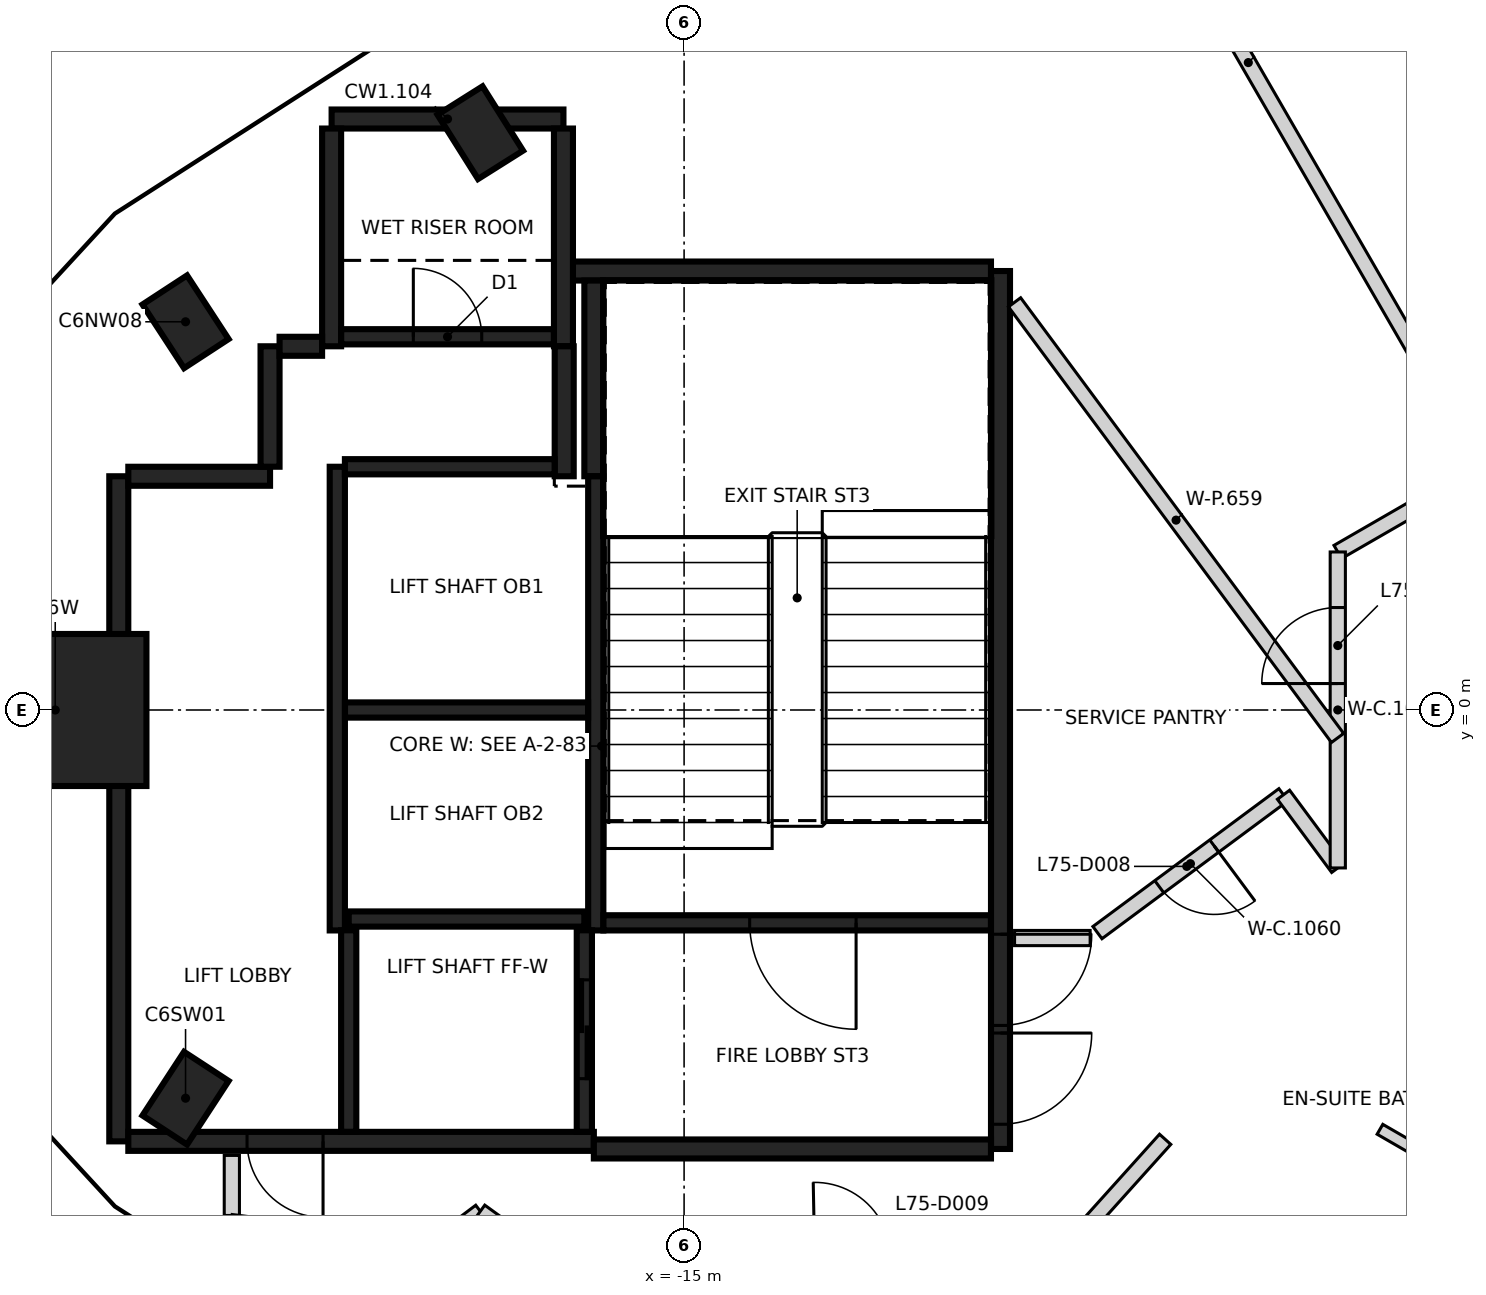
"""IFC4 building model, lengths in metres.
Left out: names, types, materials, properties, quantities, classifications, styles, units other than length and angle.
Written with IfcOpenShell. Run it as: python <this file> out.ifc"""

import sys

from ifc_helpers import new_model, si_unit, direction, frame, frame_2d, origin, origin_2d, place, context, subcontext, project, spatial, rectangle, extrude, element, fill, save


model = new_model("IFC4")
c1 = context("Model", 3, precision=1e-05, world=origin(), true_north=direction((0.0, 1.0)))
c2 = subcontext(c1, "Body", "Model", "MODEL_VIEW")
j1 = project(units=[si_unit("LENGTHUNIT", "METRE"), si_unit("PLANEANGLEUNIT", "RADIAN")], contexts=[c1])
p1 = place(None, origin())
s1 = spatial("IfcSite", under=j1, at=p1, CompositionType="ELEMENT")
p2 = place(p1, origin())
s2 = spatial("IfcBuilding", under=s1, at=p2, CompositionType="ELEMENT")
p3 = place(p2, frame((0.0, 0.0, 298.2)))
s3 = spatial("IfcBuildingStorey", under=s2, at=p3, CompositionType="ELEMENT", Elevation=298.2)
for number, where, z_axis, x_axis in (
    (1, (-17.681, 7.595, -0.35), (0.0, 0.0, 1.0), (-0.533, 0.846, 0.0)),
    (2, (-21.559, 5.107, -0.35), (0.0, 0.0, 1.0), (-0.547, 0.837, 0.0)),
    (3, (-21.559, -5.107, -0.35), (0.0, 0.0, 1.0), (0.547, 0.837, 0.0)),
):
    element("IfcColumn", number, at=place(p3, frame(where, z_axis=z_axis, x_axis=x_axis)), inside=s3, PredefinedType="COLUMN", context=c2, shape_type="SweptSolid", body=[
        extrude(rectangle(XDim=1.0, YDim=0.7, at=origin_2d()), origin(), (0.0, 0.0, 1.0), 2.64),
    ])
p4 = place(p3, frame((-23.273, 0.0, -0.35), z_axis=(0.0, 0.0, 1.0), x_axis=(1.0, 0.0, 0.0)))
e4 = element("IfcColumn", 4, at=p4, inside=s3, PredefinedType="COLUMN", context=c2, shape_type="SweptSolid", body=[
    extrude(rectangle(XDim=2.4, YDim=2.0, at=origin_2d()), origin(), (0.0, 0.0, 1.0), 3.55),
])
p5 = place(p3, frame((-10.837, 5.775, 0.0), z_axis=(0.0, 0.0, 1.0), x_axis=(0.0, -1.0, 0.0)))
e5 = element("IfcWall", 5, at=p5, inside=s3, PredefinedType="SHEAR", context=c2, shape_type="SweptSolid", body=[
    extrude(rectangle(XDim=11.55, YDim=0.25, at=frame_2d((5.775, 0.0))), origin(), (0.0, 0.0, 1.0), 3.2),
])
p6 = place(p5, frame((10.025, 0.0, 0.0)))
e6 = element("IfcOpeningElement", 6, at=p6, cuts=e5, PredefinedType="OPENING", context=c2, shape_type="SweptSolid", body=[
    extrude(rectangle(XDim=1.2, YDim=2.1, at=frame_2d((0.6, 1.05))), frame((0.0, 0.135, 0.0), z_axis=(0.0, -1.0, 0.0), x_axis=(1.0, 0.0, 0.0)), (0.0, 0.0, 1.0), 0.27),
])
p7 = place(p5, frame((8.725, 0.0, 0.0)))
e7 = element("IfcOpeningElement", 7, at=p7, cuts=e5, PredefinedType="OPENING", context=c2, shape_type="SweptSolid", body=[
    extrude(rectangle(XDim=1.2, YDim=2.1, at=frame_2d((0.6, 1.05))), frame((0.0, 0.135, 0.0), z_axis=(0.0, -1.0, 0.0), x_axis=(1.0, 0.0, 0.0)), (0.0, 0.0, 1.0), 0.27),
])
p8 = place(p3, frame((-22.437, -5.675, 0.0), z_axis=(0.0, 0.0, 1.0), x_axis=(0.0, 1.0, 0.0)))
e8 = element("IfcWall", 8, at=p8, inside=s3, PredefinedType="SHEAR", context=c2, shape_type="SweptSolid", body=[
    extrude(rectangle(XDim=8.75, YDim=0.25, at=frame_2d((4.375, 0.0))), origin(), (0.0, 0.0, 1.0), 3.2),
])
p9 = place(p3, frame((-16.187, -5.675, 0.0), z_axis=(0.0, 0.0, 1.0), x_axis=(-1.0, 0.0, 0.0)))
e9 = element("IfcWall", 9, at=p9, inside=s3, PredefinedType="SHEAR", context=c2, shape_type="SweptSolid", body=[
    extrude(rectangle(XDim=6.125, YDim=0.25, at=frame_2d((3.062, 0.0))), origin(), (0.0, 0.0, 1.0), 3.2),
])
p10 = place(p9, frame((3.563, 0.0, 0.0)))
e10 = element("IfcOpeningElement", 10, at=p10, cuts=e9, PredefinedType="OPENING", context=c2, shape_type="SweptSolid", body=[
    extrude(rectangle(XDim=1.0, YDim=2.1, at=frame_2d((0.5, 1.05))), frame((0.0, 0.135, 0.0), z_axis=(0.0, -1.0, 0.0), x_axis=(1.0, 0.0, 0.0)), (0.0, 0.0, 1.0), 0.27),
])
p11 = place(p3, frame((-10.963, -5.775, 0.0), z_axis=(0.0, 0.0, 1.0), x_axis=(-1.0, 0.0, 0.0)))
e11 = element("IfcWall", 11, at=p11, inside=s3, PredefinedType="SHEAR", context=c2, shape_type="SweptSolid", body=[
    extrude(rectangle(XDim=5.225, YDim=0.25, at=frame_2d((2.612, 0.0))), origin(), (0.0, 0.0, 1.0), 3.2),
])
p12 = place(p3, frame((-16.472, 5.775, 0.0), z_axis=(0.0, 0.0, 1.0), x_axis=(1.0, 0.0, 0.0)))
e12 = element("IfcWall", 12, at=p12, inside=s3, PredefinedType="SHEAR", context=c2, shape_type="SweptSolid", body=[
    extrude(rectangle(XDim=5.51, YDim=0.25, at=frame_2d((2.755, 0.0))), origin(), (0.0, 0.0, 1.0), 3.2),
])
p13 = place(p3, frame((-19.637, 7.775, 0.0), z_axis=(0.0, 0.0, 1.0), x_axis=(1.0, 0.0, 0.0)))
e13 = element("IfcWall", 13, at=p13, inside=s3, PredefinedType="SHEAR", context=c2, shape_type="SweptSolid", body=[
    extrude(rectangle(XDim=3.05, YDim=0.25, at=frame_2d((1.525, 0.0))), origin(), (0.0, 0.0, 1.0), 3.2),
])
for number, where, z_axis, x_axis in (
    (14, (-16.587, 7.65, 0.0), (0.0, 0.0, 1.0), (0.0, -1.0, 0.0)),
    (15, (-19.637, 4.785, 0.0), (0.0, 0.0, 1.0), (0.0, 1.0, 0.0)),
):
    element("IfcWall", number, at=place(p3, frame(where, z_axis=z_axis, x_axis=x_axis)), inside=s3, PredefinedType="SHEAR", context=c2, shape_type="SweptSolid", body=[
        extrude(rectangle(XDim=2.865, YDim=0.25, at=frame_2d((1.432, 0.0))), origin(), (0.0, 0.0, 1.0), 3.2),
    ])
p14 = place(p3, frame((-16.187, 3.075, 0.0), z_axis=(0.0, 0.0, 1.0), x_axis=(0.0, 1.0, 0.0)))
e16 = element("IfcWall", 16, at=p14, inside=s3, PredefinedType="SHEAR", context=c2, shape_type="SweptSolid", body=[
    extrude(rectangle(XDim=2.575, YDim=0.25, at=frame_2d((1.287, 0.0))), origin(), (0.0, 0.0, 1.0), 3.2),
])
p15 = place(p3, frame((-22.312, 3.075, 0.0), z_axis=(0.0, 0.0, 1.0), x_axis=(1.0, 0.0, 0.0)))
e17 = element("IfcWall", 17, at=p15, inside=s3, PredefinedType="SHEAR", context=c2, shape_type="SweptSolid", body=[
    extrude(rectangle(XDim=1.865, YDim=0.25, at=frame_2d((0.932, 0.0))), origin(), (0.0, 0.0, 1.0), 3.2),
])
p16 = place(p3, frame((-16.577, 4.785, 0.0), z_axis=(0.0, 0.0, 1.0), x_axis=(0.0, -1.0, 0.0)))
e18 = element("IfcWall", 18, at=p16, inside=s3, PredefinedType="SHEAR", context=c2, shape_type="SweptSolid", body=[
    extrude(rectangle(XDim=1.71, YDim=0.25, at=frame_2d((0.855, 0.0))), origin(), (0.0, 0.0, 1.0), 3.2),
])
p17 = place(p3, frame((-20.447, 3.2, 0.0), z_axis=(0.0, 0.0, 1.0), x_axis=(0.0, 1.0, 0.0)))
e19 = element("IfcWall", 19, at=p17, inside=s3, PredefinedType="SHEAR", context=c2, shape_type="SweptSolid", body=[
    extrude(rectangle(XDim=1.584, YDim=0.25, at=frame_2d((0.792, 0.0))), origin(), (0.0, 0.0, 1.0), 3.2),
])
p18 = place(p3, frame((-20.322, 4.785, 0.0), z_axis=(0.0, 0.0, 1.0), x_axis=(1.0, 0.0, 0.0)))
e20 = element("IfcWall", 20, at=p18, inside=s3, PredefinedType="SHEAR", context=c2, shape_type="SweptSolid", body=[
    extrude(rectangle(XDim=0.559, YDim=0.25, at=frame_2d((0.28, 0.0))), origin(), (0.0, 0.0, 1.0), 3.2),
])
p19 = place(p3, frame((-16.162, 3.074, 0.0), z_axis=(0.0, 0.0, 1.0), x_axis=(0.0, -1.0, 0.0)))
e21 = element("IfcWall", 21, at=p19, inside=s3, PredefinedType="SHEAR", context=c2, shape_type="SweptSolid", body=[
    extrude(rectangle(XDim=5.974, YDim=0.2, at=frame_2d((2.987, 0.0))), origin(), (0.0, 0.0, 1.0), 3.2),
])
p20 = place(p3, frame((-19.562, -2.9, 0.0), z_axis=(0.0, 0.0, 1.0), x_axis=(0.0, 1.0, 0.0)))
e22 = element("IfcWall", 22, at=p20, inside=s3, PredefinedType="SHEAR", context=c2, shape_type="SweptSolid", body=[
    extrude(rectangle(XDim=6.1, YDim=0.2, at=frame_2d((3.05, 0.0))), origin(), (0.0, 0.0, 1.0), 3.2),
])
p21 = place(p3, frame((-10.963, -2.8, 0.0), z_axis=(0.0, 0.0, 1.0), x_axis=(-1.0, 0.0, 0.0)))
e23 = element("IfcWall", 23, at=p21, inside=s3, PredefinedType="SHEAR", context=c2, shape_type="SweptSolid", body=[
    extrude(rectangle(XDim=5.098, YDim=0.2, at=frame_2d((2.549, 0.0))), origin(), (0.0, 0.0, 1.0), 3.2),
])
p22 = place(p21, frame((1.774, 0.0, 0.0)))
e24 = element("IfcOpeningElement", 24, at=p22, cuts=e23, PredefinedType="OPENING", context=c2, shape_type="SweptSolid", body=[
    extrude(rectangle(XDim=1.4, YDim=2.1, at=frame_2d((0.7, 1.05))), frame((0.0, 0.11, 0.0), z_axis=(0.0, -1.0, 0.0), x_axis=(1.0, 0.0, 0.0)), (0.0, 0.0, 1.0), 0.22),
])
p23 = place(p3, frame((-16.263, 0.0, 0.0), z_axis=(0.0, 0.0, 1.0), x_axis=(-1.0, 0.0, 0.0)))
e25 = element("IfcWall", 25, at=p23, inside=s3, PredefinedType="SHEAR", context=c2, shape_type="SweptSolid", body=[
    extrude(rectangle(XDim=3.198, YDim=0.2, at=frame_2d((1.599, 0.0))), origin(), (0.0, 0.0, 1.0), 3.2),
])
p24 = place(p3, frame((-19.511, 4.91, 0.0), z_axis=(0.0, 0.0, 1.0), x_axis=(1.0, 0.0, 0.0)))
e26 = element("IfcWall", 26, at=p24, inside=s3, PredefinedType="SHEAR", context=c2, shape_type="SweptSolid", body=[
    extrude(rectangle(XDim=2.798, YDim=0.2, at=frame_2d((1.399, 0.0))), origin(), (0.0, 0.0, 1.0), 3.2),
])
p25 = place(p24, frame((0.949, 0.0, 0.0)))
e27 = element("IfcOpeningElement", 27, at=p25, cuts=e26, PredefinedType="OPENING", context=c2, shape_type="SweptSolid", body=[
    extrude(rectangle(XDim=0.9, YDim=2.1, at=frame_2d((0.45, 1.05))), frame((0.0, 0.11, 0.0), z_axis=(0.0, -1.0, 0.0), x_axis=(1.0, 0.0, 0.0)), (0.0, 0.0, 1.0), 0.22),
])
p26 = place(p3, frame((-19.462, 3.2, 0.0), z_axis=(0.0, 0.0, 1.0), x_axis=(1.0, 0.0, 0.0)))
e28 = element("IfcWall", 28, at=p26, inside=s3, PredefinedType="SHEAR", context=c2, shape_type="SweptSolid", body=[
    extrude(rectangle(XDim=2.759, YDim=0.2, at=frame_2d((1.379, 0.0))), origin(), (0.0, 0.0, 1.0), 3.2),
])
p27 = place(p3, frame((-19.412, -2.75, 0.0), z_axis=(0.0, 0.0, 1.0), x_axis=(1.0, 0.0, 0.0)))
e29 = element("IfcWall", 29, at=p27, inside=s3, PredefinedType="SHEAR", context=c2, shape_type="SweptSolid", body=[
    extrude(rectangle(XDim=3.1, YDim=0.2, at=frame_2d((1.55, 0.0))), origin(), (0.0, 0.0, 1.0), 3.2),
])
p28 = place(p3, frame((-16.312, -2.898, 0.0), z_axis=(0.0, 0.0, 1.0), x_axis=(0.0, -1.0, 0.0)))
e30 = element("IfcWall", 30, at=p28, inside=s3, PredefinedType="SHEAR", context=c2, shape_type="SweptSolid", body=[
    extrude(rectangle(XDim=2.651, YDim=0.2, at=frame_2d((1.325, 0.0))), origin(), (0.0, 0.0, 1.0), 3.2),
])
p29 = place(p28, frame((0.652, 0.0, 0.0)))
e31 = element("IfcOpeningElement", 31, at=p29, cuts=e30, PredefinedType="OPENING", context=c2, shape_type="SweptSolid", body=[
    extrude(rectangle(XDim=1.3, YDim=2.1, at=frame_2d((0.65, 1.05))), frame((0.0, 0.11, 0.0), z_axis=(0.0, -1.0, 0.0), x_axis=(1.0, 0.0, 0.0)), (0.0, 0.0, 1.0), 0.22),
])
p30 = place(p3, frame((-19.412, -5.549, 0.0), z_axis=(0.0, 0.0, 1.0), x_axis=(0.0, 1.0, 0.0)))
e32 = element("IfcWall", 32, at=p30, inside=s3, PredefinedType="SHEAR", context=c2, shape_type="SweptSolid", body=[
    extrude(rectangle(XDim=2.651, YDim=0.2, at=frame_2d((1.325, 0.0))), origin(), (0.0, 0.0, 1.0), 3.2),
])
p31 = place(p3, frame((-20.95, -6.65, 0.0), z_axis=(0.0, 0.0, 1.0), x_axis=(0.0, 1.0, 0.0)))
e33 = element("IfcWall", 33, at=p31, inside=s3, PredefinedType="PARTITIONING", context=c2, shape_type="SweptSolid", body=[
    extrude(rectangle(XDim=0.79, YDim=0.2, at=frame_2d((0.395, 0.0))), origin(), (0.0, 0.0, 1.0), 3.2),
])
p32 = place(p3, frame((-20.929, -7.305, 0.0), z_axis=(0.0, 0.0, 1.0), x_axis=(0.125718385971, 0.992065969293, 0.0)))
e34 = element("IfcWall", 34, at=p32, inside=s3, PredefinedType="PARTITIONING", context=c2, shape_type="SweptSolid", body=[
    extrude(rectangle(XDim=0.66, YDim=0.2, at=frame_2d((0.33, 0.0))), origin(), (0.0, 0.0, 1.0), 3.2),
])
p33 = place(p3, frame((-18.642, -7.319, 0.0), z_axis=(0.0, 0.0, 1.0), x_axis=(0.798707882989, 0.601718968998, 0.0)))
e35 = element("IfcWall", 35, at=p33, inside=s3, PredefinedType="PARTITIONING", context=c2, shape_type="SweptSolid", body=[
    extrude(rectangle(XDim=1.203, YDim=0.2, at=frame_2d((0.602, 0.0))), origin(), (0.0, 0.0, 1.0), 2.29),
])
p34 = place(p3, frame((-17.681, -6.595, 0.0), z_axis=(0.0, 0.0, 1.0), x_axis=(0.810123213102, -0.586259652026, 0.0)))
e36 = element("IfcWall", 36, at=p34, inside=s3, PredefinedType="PARTITIONING", context=c2, shape_type="SweptSolid", body=[
    extrude(rectangle(XDim=1.17, YDim=0.2, at=frame_2d((0.585, 0.0))), origin(), (0.0, 0.0, 1.0), 3.2),
])
p35 = place(p3, frame((-10.652, -3.0, 0.0), z_axis=(0.0, 0.0, 1.0), x_axis=(1.0, 0.0, 0.0)))
e37 = element("IfcWall", 37, at=p35, inside=s3, PredefinedType="PARTITIONING", context=c2, shape_type="SweptSolid", body=[
    extrude(rectangle(XDim=0.994, YDim=0.2, at=frame_2d((0.497, 0.0))), origin(), (0.0, 0.0, 1.0), 3.2),
])
p36 = place(p3, frame((-10.023, -7.151, 0.0), z_axis=(0.0, 0.0, 1.0), x_axis=(0.668804583793, 0.743438248073, 0.0)))
e38 = element("IfcWall", 38, at=p36, inside=s3, PredefinedType="PARTITIONING", context=c2, shape_type="SweptSolid", body=[
    extrude(rectangle(XDim=2.021, YDim=0.2, at=frame_2d((1.011, 0.0))), origin(), (0.0, 0.0, 1.0), 3.2),
])
p37 = place(p3, frame((-7.115, -1.115, 0.0), z_axis=(0.0, 0.0, 1.0), x_axis=(-0.803344165632, -0.595515030495, 0.0)))
e39 = element("IfcWall", 39, at=p37, inside=s3, PredefinedType="PARTITIONING", context=c2, shape_type="SweptSolid", body=[
    extrude(rectangle(XDim=3.046, YDim=0.2, at=frame_2d((1.523, 0.0))), origin(), (0.0, 0.0, 1.0), 3.2),
])
p38 = place(p37, frame((1.133, 0.0, 0.0)))
e40 = element("IfcOpeningElement", 40, at=p38, cuts=e39, PredefinedType="OPENING", context=c2, shape_type="SweptSolid", body=[
    extrude(rectangle(XDim=0.9, YDim=2.1, at=frame_2d((0.45, 1.05))), frame((0.0, 0.11, 0.0), z_axis=(0.0, -1.0, 0.0), x_axis=(1.0, 0.0, 0.0)), (0.0, 0.0, 1.0), 0.22),
])
p39 = place(p3, frame((-7.114, -1.115, 0.0), z_axis=(0.0, 0.0, 1.0), x_axis=(0.595690139668, -0.803214328496, 0.0)))
e41 = element("IfcWall", 41, at=p39, inside=s3, PredefinedType="PARTITIONING", context=c2, shape_type="SweptSolid", body=[
    extrude(rectangle(XDim=1.199, YDim=0.2, at=frame_2d((0.599, 0.0))), origin(), (0.0, 0.0, 1.0), 3.2),
])
p40 = place(p3, frame((-6.4, 2.079, 0.0), z_axis=(0.0, 0.0, 1.0), x_axis=(0.866037708501, 0.499978687001, 0.0)))
e42 = element("IfcWall", 42, at=p40, inside=s3, PredefinedType="PARTITIONING", context=c2, shape_type="SweptSolid", body=[
    extrude(rectangle(XDim=6.818, YDim=0.2, at=frame_2d((3.409, 0.0))), origin(), (0.0, 0.0, 1.0), 3.2),
])
p41 = place(p40, frame((4.003, 0.0, 0.0)))
e43 = element("IfcOpeningElement", 43, at=p41, cuts=e42, PredefinedType="OPENING", context=c2, shape_type="SweptSolid", body=[
    extrude(rectangle(XDim=1.0, YDim=2.1, at=frame_2d((0.5, 1.05))), frame((0.0, 0.11, 0.0), z_axis=(0.0, -1.0, 0.0), x_axis=(1.0, 0.0, 0.0)), (0.0, 0.0, 1.0), 0.22),
])
p42 = place(p3, frame((-6.4, -2.078, 0.0), z_axis=(0.0, 0.0, 1.0), x_axis=(0.0, 1.0, 0.0)))
e44 = element("IfcWall", 44, at=p42, inside=s3, PredefinedType="PARTITIONING", context=c2, shape_type="SweptSolid", body=[
    extrude(rectangle(XDim=4.157, YDim=0.2, at=frame_2d((2.079, 0.0))), origin(), (0.0, 0.0, 1.0), 3.2),
])
p43 = place(p42, frame((2.426, 0.0, 0.0)))
e45 = element("IfcOpeningElement", 45, at=p43, cuts=e44, PredefinedType="OPENING", context=c2, shape_type="SweptSolid", body=[
    extrude(rectangle(XDim=1.0, YDim=2.1, at=frame_2d((0.5, 1.05))), frame((0.0, 0.11, 0.0), z_axis=(0.0, -1.0, 0.0), x_axis=(1.0, 0.0, 0.0)), (0.0, 0.0, 1.0), 0.22),
])
p44 = place(p3, frame((-10.652, 5.364, 0.0), z_axis=(0.0, 0.0, 1.0), x_axis=(0.595550732464, -0.803317698711, 0.0)))
e46 = element("IfcWall", 46, at=p44, inside=s3, PredefinedType="PARTITIONING", context=c2, shape_type="SweptSolid", body=[
    extrude(rectangle(XDim=7.135, YDim=0.2, at=frame_2d((3.567, 0.0))), origin(), (0.0, 0.0, 1.0), 3.2),
])
p45 = place(p3, frame((-10.659, 13.856, 0.0), z_axis=(0.0, 0.0, 1.0), x_axis=(0.500004723409, -0.866022676706, 0.0)))
e47 = element("IfcWall", 47, at=p45, inside=s3, PredefinedType="PARTITIONING", context=c2, shape_type="SweptSolid", body=[
    extrude(rectangle(XDim=12.329, YDim=0.2, at=frame_2d((6.164, 0.0))), origin(), (0.0, 0.0, 1.0), 3.2),
])
p46 = place(p3, frame((-6.67, -16.159, 0.0), z_axis=(0.0, 0.0, 1.0), x_axis=(0.500017276951, 0.866015428702, 0.0)))
e48 = element("IfcWall", 48, at=p46, inside=s3, PredefinedType="PARTITIONING", context=c2, shape_type="SweptSolid", body=[
    extrude(rectangle(XDim=12.329, YDim=0.2, at=frame_2d((6.165, 0.0))), origin(), (0.0, 0.0, 1.0), 3.2),
])
p47 = place(p3, frame((-5.845, -5.516, 0.0), z_axis=(0.0, 0.0, 1.0), x_axis=(0.865972526687, -0.500091574638, 0.0)))
e49 = element("IfcWall", 49, at=p47, inside=s3, PredefinedType="PARTITIONING", context=c2, shape_type="SweptSolid", body=[
    extrude(rectangle(XDim=2.099, YDim=0.15, at=frame_2d((1.05, 0.0))), origin(), (0.0, 0.0, 1.0), 3.2),
])
p48 = place(p29, origin())
e50 = element("IfcDoor", 50, at=p48, inside=s3, OperationType="SLIDING_TO_LEFT", PredefinedType="DOOR", context=c2, shape_type="SweptSolid", body=[
    extrude(rectangle(XDim=1.3, YDim=2.1, at=frame_2d((0.65, 1.05))), frame((0.0, 0.025, 0.0), z_axis=(0.0, -1.0, 0.0), x_axis=(1.0, 0.0, 0.0)), (0.0, 0.0, 1.0), 0.05),
])
fill(e31, e50)
p49 = place(p10, origin())
e51 = element("IfcDoor", 51, at=p49, inside=s3, OperationType="SINGLE_SWING_LEFT", PredefinedType="DOOR", context=c2, shape_type="SweptSolid", body=[
    extrude(rectangle(XDim=1.0, YDim=2.1, at=frame_2d((0.5, 1.05))), frame((0.0, 0.025, 0.0), z_axis=(0.0, -1.0, 0.0), x_axis=(1.0, 0.0, 0.0)), (0.0, 0.0, 1.0), 0.05),
])
fill(e10, e51)
p50 = place(p6, origin())
e52 = element("IfcDoor", 52, at=p50, inside=s3, OperationType="SINGLE_SWING_LEFT", PredefinedType="DOOR", context=c2, shape_type="SweptSolid", body=[
    extrude(rectangle(XDim=1.2, YDim=2.1, at=frame_2d((0.6, 1.05))), frame((0.0, 0.025, 0.0), z_axis=(0.0, -1.0, 0.0), x_axis=(1.0, 0.0, 0.0)), (0.0, 0.0, 1.0), 0.05),
])
fill(e6, e52)
p51 = place(p7, origin())
e53 = element("IfcDoor", 53, at=p51, inside=s3, OperationType="SINGLE_SWING_RIGHT", PredefinedType="DOOR", context=c2, shape_type="SweptSolid", body=[
    extrude(rectangle(XDim=1.2, YDim=2.1, at=frame_2d((0.6, 1.05))), frame((0.0, 0.025, 0.0), z_axis=(0.0, -1.0, 0.0), x_axis=(1.0, 0.0, 0.0)), (0.0, 0.0, 1.0), 0.05),
])
fill(e7, e53)
p52 = place(p22, origin())
e54 = element("IfcDoor", 54, at=p52, inside=s3, OperationType="SINGLE_SWING_LEFT", PredefinedType="DOOR", context=c2, shape_type="SweptSolid", body=[
    extrude(rectangle(XDim=1.4, YDim=2.1, at=frame_2d((0.7, 1.05))), frame((0.0, 0.025, 0.0), z_axis=(0.0, -1.0, 0.0), x_axis=(1.0, 0.0, 0.0)), (0.0, 0.0, 1.0), 0.05),
])
fill(e24, e54)
p53 = place(p25, origin())
e55 = element("IfcDoor", 55, at=p53, inside=s3, OperationType="SINGLE_SWING_RIGHT", PredefinedType="DOOR", context=c2, shape_type="SweptSolid", body=[
    extrude(rectangle(XDim=0.9, YDim=2.1, at=frame_2d((0.45, 1.05))), frame((0.0, 0.025, 0.0), z_axis=(0.0, -1.0, 0.0), x_axis=(1.0, 0.0, 0.0)), (0.0, 0.0, 1.0), 0.05),
])
fill(e27, e55)
p54 = place(p43, origin())
e56 = element("IfcDoor", 56, at=p54, inside=s3, OperationType="SINGLE_SWING_LEFT", PredefinedType="DOOR", context=c2, shape_type="SweptSolid", body=[
    extrude(rectangle(XDim=1.0, YDim=2.1, at=frame_2d((0.5, 1.05))), frame((0.0, 0.025, 0.0), z_axis=(0.0, -1.0, 0.0), x_axis=(1.0, 0.0, 0.0)), (0.0, 0.0, 1.0), 0.05),
])
fill(e45, e56)
p55 = place(p38, origin())
e57 = element("IfcDoor", 57, at=p55, inside=s3, OperationType="SINGLE_SWING_LEFT", PredefinedType="DOOR", context=c2, shape_type="SweptSolid", body=[
    extrude(rectangle(XDim=0.9, YDim=2.1, at=frame_2d((0.45, 1.05))), frame((0.0, 0.025, 0.0), z_axis=(0.0, -1.0, 0.0), x_axis=(1.0, 0.0, 0.0)), (0.0, 0.0, 1.0), 0.05),
])
fill(e40, e57)
save(model, sys.argv[1])
